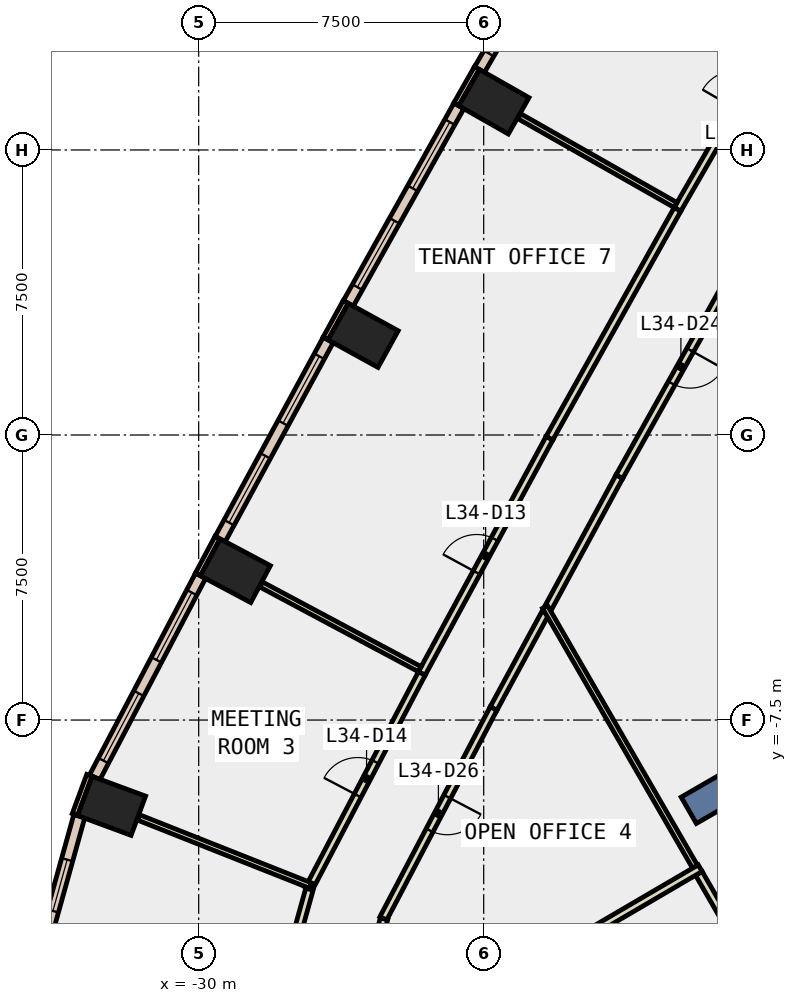
"""IFC4 building model, lengths in metres.
Left out: names, types, materials, properties, quantities, classifications, styles, units other than length and angle.
Written with IfcOpenShell. Run it as: python <this file> out.ifc"""

import sys

from ifc_helpers import new_model, si_unit, direction, frame, frame_2d, origin, origin_2d, place, context, subcontext, project, spatial, rectangle, extrude, element, fill, save


model = new_model("IFC4")
c1 = context("Model", 3, precision=1e-05, world=origin(), true_north=direction((0.0, 1.0)))
c2 = subcontext(c1, "Body", "Model", "MODEL_VIEW")
j1 = project(units=[si_unit("LENGTHUNIT", "METRE"), si_unit("PLANEANGLEUNIT", "RADIAN")], contexts=[c1])
p1 = place(None, origin())
s1 = spatial("IfcSite", under=j1, at=p1, CompositionType="ELEMENT")
p2 = place(p1, origin())
s2 = spatial("IfcBuilding", under=s1, at=p2, CompositionType="ELEMENT")
p3 = place(p2, frame((0.0, 0.0, 155.0)))
s3 = spatial("IfcBuildingStorey", under=s2, at=p3, CompositionType="ELEMENT", Elevation=155.0)
for number, where, z_axis, x_axis in (
    (1, (-22.232, 8.769, -0.4), (0.0, 0.0, 1.0), (0.494, 0.869, 0.0)),
    (2, (-25.673, 2.622, -0.4), (0.0, 0.0, 1.0), (0.482, 0.876, 0.0)),
    (3, (-29.034, -3.571, -0.4), (0.0, 0.0, 1.0), (0.47, 0.883, 0.0)),
    (4, (-32.292, -9.758, -0.4), (0.0, 0.0, 1.0), (0.347, 0.938, 0.0)),
):
    element("IfcColumn", number, at=place(p3, frame(where, z_axis=z_axis, x_axis=x_axis)), inside=s3, PredefinedType="COLUMN", context=c2, shape_type="SweptSolid", body=[
        extrude(rectangle(XDim=1.1, YDim=1.5, at=origin_2d()), origin(), (0.0, 0.0, 1.0), 4.2),
    ])
p4 = place(p3, frame((-9.31, -5.375, -0.4), z_axis=(0.0, 0.0, 1.0), x_axis=(-0.866017533419, -0.500013631625, 0.0)))
e5 = element("IfcWall", 5, at=p4, inside=s3, PredefinedType="SHEAR", context=c2, shape_type="SweptSolid", body=[
    extrude(rectangle(XDim=9.0, YDim=0.8, at=frame_2d((4.5, 0.0))), origin(), (0.0, 0.0, 1.0), 4.2),
])
for number, where, z_axis, x_axis in (
    (6, (-22.678, 9.655, 0.0), (0.0, 0.0, 1.0), (-0.495, -0.869, 0.0)),
    (7, (-26.131, 3.502, 0.0), (0.0, 0.0, 1.0), (-0.482, -0.876, 0.0)),
):
    element("IfcWall", number, at=place(p3, frame(where, z_axis=z_axis, x_axis=x_axis)), inside=s3, PredefinedType="STANDARD", context=c2, shape_type="SweptSolid", body=[
        extrude(rectangle(XDim=1.1, YDim=0.15, at=frame_2d((0.55, 0.0))), origin(), (0.0, 0.0, 1.0), 3.8),
    ])
for number, where, z_axis, x_axis in (
    (8, (-29.503, -2.698, 0.0), (0.0, 0.0, 1.0), (-0.47, -0.883, 0.0)),
    (9, (-32.875, -8.956, 0.0), (0.0, 0.0, 1.0), (-0.346, -0.938, 0.0)),
):
    element("IfcWall", number, at=place(p3, frame(where, z_axis=z_axis, x_axis=x_axis)), inside=s3, PredefinedType="STANDARD", context=c2, shape_type="SweptSolid", body=[
        extrude(rectangle(XDim=1.1, YDim=0.15, at=frame_2d((0.55, 0.0))), origin(), (0.0, 0.0, 1.0), 3.8),
    ])
p5 = place(p3, frame((-19.631, 14.774, 0.0), z_axis=(0.0, 0.0, 1.0), x_axis=(-0.500061823953, -0.865989706766, 0.0)))
e10 = element("IfcWall", 10, at=p5, inside=s3, PredefinedType="STANDARD", context=c2, shape_type="SweptSolid", body=[
    extrude(rectangle(XDim=5.957, YDim=0.3, at=frame_2d((2.979, 0.0))), origin(), (0.0, 0.0, 1.0), 3.8),
])
p6 = place(p5, frame((0.489, 0.0, 0.9)))
e11 = element("IfcOpeningElement", 11, at=p6, cuts=e10, PredefinedType="OPENING", context=c2, shape_type="SweptSolid", body=[
    extrude(rectangle(XDim=2.0, YDim=2.6, at=frame_2d((1.0, 1.3))), frame((0.0, 0.16, 0.0), z_axis=(0.0, -1.0, 0.0), x_axis=(1.0, 0.0, 0.0)), (0.0, 0.0, 1.0), 0.32),
])
p7 = place(p5, frame((3.468, 0.0, 0.9)))
e12 = element("IfcOpeningElement", 12, at=p7, cuts=e10, PredefinedType="OPENING", context=c2, shape_type="SweptSolid", body=[
    extrude(rectangle(XDim=2.0, YDim=2.6, at=frame_2d((1.0, 1.3))), frame((0.0, 0.16, 0.0), z_axis=(0.0, -1.0, 0.0), x_axis=(1.0, 0.0, 0.0)), (0.0, 0.0, 1.0), 0.32),
])
p8 = place(p3, frame((-23.153, 8.661, 0.0), z_axis=(0.0, 0.0, 1.0), x_axis=(-0.488354983501, -0.872645065356, 0.0)))
e13 = element("IfcWall", 13, at=p8, inside=s3, PredefinedType="STANDARD", context=c2, shape_type="SweptSolid", body=[
    extrude(rectangle(XDim=5.957, YDim=0.3, at=frame_2d((2.978, 0.0))), origin(), (0.0, 0.0, 1.0), 3.8),
])
p9 = place(p8, frame((0.489, 0.0, 0.9)))
e14 = element("IfcOpeningElement", 14, at=p9, cuts=e13, PredefinedType="OPENING", context=c2, shape_type="SweptSolid", body=[
    extrude(rectangle(XDim=2.0, YDim=2.6, at=frame_2d((1.0, 1.3))), frame((0.0, 0.16, 0.0), z_axis=(0.0, -1.0, 0.0), x_axis=(1.0, 0.0, 0.0)), (0.0, 0.0, 1.0), 0.32),
])
p10 = place(p8, frame((3.467, 0.0, 0.9)))
e15 = element("IfcOpeningElement", 15, at=p10, cuts=e13, PredefinedType="OPENING", context=c2, shape_type="SweptSolid", body=[
    extrude(rectangle(XDim=2.0, YDim=2.6, at=frame_2d((1.0, 1.3))), frame((0.0, 0.16, 0.0), z_axis=(0.0, -1.0, 0.0), x_axis=(1.0, 0.0, 0.0)), (0.0, 0.0, 1.0), 0.32),
])
p11 = place(p3, frame((-26.592, 2.501, 0.0), z_axis=(0.0, 0.0, 1.0), x_axis=(-0.476970695077, -0.878919197673, 0.0)))
e16 = element("IfcWall", 16, at=p11, inside=s3, PredefinedType="STANDARD", context=c2, shape_type="SweptSolid", body=[
    extrude(rectangle(XDim=5.958, YDim=0.3, at=frame_2d((2.979, 0.0))), origin(), (0.0, 0.0, 1.0), 3.8),
])
p12 = place(p11, frame((0.49, 0.0, 0.9)))
e17 = element("IfcOpeningElement", 17, at=p12, cuts=e16, PredefinedType="OPENING", context=c2, shape_type="SweptSolid", body=[
    extrude(rectangle(XDim=2.0, YDim=2.6, at=frame_2d((1.0, 1.3))), frame((0.0, 0.16, 0.0), z_axis=(0.0, -1.0, 0.0), x_axis=(1.0, 0.0, 0.0)), (0.0, 0.0, 1.0), 0.32),
])
p13 = place(p11, frame((3.469, 0.0, 0.9)))
e18 = element("IfcOpeningElement", 18, at=p13, cuts=e16, PredefinedType="OPENING", context=c2, shape_type="SweptSolid", body=[
    extrude(rectangle(XDim=2.0, YDim=2.6, at=frame_2d((1.0, 1.3))), frame((0.0, 0.16, 0.0), z_axis=(0.0, -1.0, 0.0), x_axis=(1.0, 0.0, 0.0)), (0.0, 0.0, 1.0), 0.32),
])
p14 = place(p3, frame((-29.951, -3.705, 0.0), z_axis=(0.0, 0.0, 1.0), x_axis=(-0.465104650407, -0.885255705528, 0.0)))
e19 = element("IfcWall", 19, at=p14, inside=s3, PredefinedType="STANDARD", context=c2, shape_type="SweptSolid", body=[
    extrude(rectangle(XDim=5.99, YDim=0.3, at=frame_2d((2.995, 0.0))), origin(), (0.0, 0.0, 1.0), 3.8),
])
p15 = place(p14, frame((0.498, 0.0, 0.9)))
e20 = element("IfcOpeningElement", 20, at=p15, cuts=e19, PredefinedType="OPENING", context=c2, shape_type="SweptSolid", body=[
    extrude(rectangle(XDim=2.0, YDim=2.6, at=frame_2d((1.0, 1.3))), frame((0.0, 0.16, 0.0), z_axis=(0.0, -1.0, 0.0), x_axis=(1.0, 0.0, 0.0)), (0.0, 0.0, 1.0), 0.32),
])
p16 = place(p14, frame((3.493, 0.0, 0.9)))
e21 = element("IfcOpeningElement", 21, at=p16, cuts=e19, PredefinedType="OPENING", context=c2, shape_type="SweptSolid", body=[
    extrude(rectangle(XDim=2.0, YDim=2.6, at=frame_2d((1.0, 1.3))), frame((0.0, 0.16, 0.0), z_axis=(0.0, -1.0, 0.0), x_axis=(1.0, 0.0, 0.0)), (0.0, 0.0, 1.0), 0.32),
])
p17 = place(p3, frame((-33.142, -10.029, 0.0), z_axis=(0.0, 0.0, 1.0), x_axis=(-0.26799398221, -0.963420585985, 0.0)))
e22 = element("IfcWall", 22, at=p17, inside=s3, PredefinedType="STANDARD", context=c2, shape_type="SweptSolid", body=[
    extrude(rectangle(XDim=3.776, YDim=0.3, at=frame_2d((1.888, 0.0))), origin(), (0.0, 0.0, 1.0), 3.8),
])
p18 = place(p17, frame((1.188, 0.0, 0.9)))
e23 = element("IfcOpeningElement", 23, at=p18, cuts=e22, PredefinedType="OPENING", context=c2, shape_type="SweptSolid", body=[
    extrude(rectangle(XDim=1.4, YDim=2.6, at=frame_2d((0.7, 1.3))), frame((0.0, 0.16, 0.0), z_axis=(0.0, -1.0, 0.0), x_axis=(1.0, 0.0, 0.0)), (0.0, 0.0, 1.0), 0.32),
])
p19 = place(p3, frame((-18.93, -1.095, 0.0), z_axis=(0.0, 0.0, 1.0), x_axis=(-0.476854303058, -0.878982351162, 0.0)))
e24 = element("IfcWall", 24, at=p19, inside=s3, PredefinedType="PARTITIONING", context=c2, shape_type="SweptSolid", body=[
    extrude(rectangle(XDim=3.924, YDim=0.2, at=frame_2d((1.962, 0.0))), origin(), (0.0, 0.0, 1.0), 3.8),
])
p20 = place(p3, frame((-15.692, 4.689, 0.0), z_axis=(0.0, 0.0, 1.0), x_axis=(-0.48849233301, -0.872568186786, 0.0)))
e25 = element("IfcWall", 25, at=p20, inside=s3, PredefinedType="PARTITIONING", context=c2, shape_type="SweptSolid", body=[
    extrude(rectangle(XDim=6.629, YDim=0.2, at=frame_2d((3.314, 0.0))), origin(), (0.0, 0.0, 1.0), 3.8),
])
p21 = place(p20, frame((2.814, 0.0, 0.0)))
e26 = element("IfcOpeningElement", 26, at=p21, cuts=e25, PredefinedType="OPENING", context=c2, shape_type="SweptSolid", body=[
    extrude(rectangle(XDim=1.0, YDim=2.1, at=frame_2d((0.5, 1.05))), frame((0.0, 0.11, 0.0), z_axis=(0.0, -1.0, 0.0), x_axis=(1.0, 0.0, 0.0)), (0.0, 0.0, 1.0), 0.22),
])
p22 = place(p3, frame((-20.873, -4.676, 0.0), z_axis=(0.0, 0.0, 1.0), x_axis=(-0.476781985736, -0.879021579984, 0.0)))
e27 = element("IfcWall", 27, at=p22, inside=s3, PredefinedType="PARTITIONING", context=c2, shape_type="SweptSolid", body=[
    extrude(rectangle(XDim=2.869, YDim=0.2, at=frame_2d((1.435, 0.0))), origin(), (0.0, 0.0, 1.0), 3.8),
])
p23 = place(p3, frame((-22.241, -7.198, 0.0), z_axis=(0.0, 0.0, 1.0), x_axis=(-0.465089990515, -0.885263407536, 0.0)))
e28 = element("IfcWall", 28, at=p23, inside=s3, PredefinedType="PARTITIONING", context=c2, shape_type="SweptSolid", body=[
    extrude(rectangle(XDim=6.24, YDim=0.2, at=frame_2d((3.12, 0.0))), origin(), (0.0, 0.0, 1.0), 3.8),
])
p24 = place(p23, frame((2.62, 0.0, 0.0)))
e29 = element("IfcOpeningElement", 29, at=p24, cuts=e28, PredefinedType="OPENING", context=c2, shape_type="SweptSolid", body=[
    extrude(rectangle(XDim=1.0, YDim=2.1, at=frame_2d((0.5, 1.05))), frame((0.0, 0.11, 0.0), z_axis=(0.0, -1.0, 0.0), x_axis=(1.0, 0.0, 0.0)), (0.0, 0.0, 1.0), 0.22),
])
p25 = place(p3, frame((-25.123, -12.73, 0.0), z_axis=(0.0, 0.0, 1.0), x_axis=(-0.268139825244, -0.963380005044, 0.0)))
e30 = element("IfcWall", 30, at=p25, inside=s3, PredefinedType="PARTITIONING", context=c2, shape_type="SweptSolid", body=[
    extrude(rectangle(XDim=1.726, YDim=0.2, at=frame_2d((0.863, 0.0))), origin(), (0.0, 0.0, 1.0), 3.8),
])
p26 = place(p3, frame((-17.402, 5.936, 0.0), z_axis=(0.0, 0.0, 1.0), x_axis=(0.500135788517, 0.865946992052, 0.0)))
e31 = element("IfcWall", 31, at=p26, inside=s3, PredefinedType="PARTITIONING", context=c2, shape_type="SweptSolid", body=[
    extrude(rectangle(XDim=6.97, YDim=0.2, at=frame_2d((3.485, 0.0))), origin(), (0.0, 0.0, 1.0), 3.8),
])
p27 = place(p26, frame((3.06, 0.0, 0.0)))
e32 = element("IfcOpeningElement", 32, at=p27, cuts=e31, PredefinedType="OPENING", context=c2, shape_type="SweptSolid", body=[
    extrude(rectangle(XDim=1.0, YDim=2.1, at=frame_2d((0.5, 1.05))), frame((0.0, 0.11, 0.0), z_axis=(0.0, -1.0, 0.0), x_axis=(1.0, 0.0, 0.0)), (0.0, 0.0, 1.0), 0.22),
])
p28 = place(p3, frame((-24.13, -6.275, 0.0), z_axis=(0.0, 0.0, 1.0), x_axis=(0.476981750532, 0.878913198023, 0.0)))
e33 = element("IfcWall", 33, at=p28, inside=s3, PredefinedType="PARTITIONING", context=c2, shape_type="SweptSolid", body=[
    extrude(rectangle(XDim=7.046, YDim=0.2, at=frame_2d((3.523, 0.0))), origin(), (0.0, 0.0, 1.0), 3.8),
])
p29 = place(p28, frame((3.023, 0.0, 0.0)))
e34 = element("IfcOpeningElement", 34, at=p29, cuts=e33, PredefinedType="OPENING", context=c2, shape_type="SweptSolid", body=[
    extrude(rectangle(XDim=1.0, YDim=2.1, at=frame_2d((0.5, 1.05))), frame((0.0, 0.11, 0.0), z_axis=(0.0, -1.0, 0.0), x_axis=(1.0, 0.0, 0.0)), (0.0, 0.0, 1.0), 0.22),
])
p30 = place(p3, frame((-20.769, -0.082, 0.0), z_axis=(0.0, 0.0, 1.0), x_axis=(0.488387759141, 0.872626722443, 0.0)))
e35 = element("IfcWall", 35, at=p30, inside=s3, PredefinedType="PARTITIONING", context=c2, shape_type="SweptSolid", body=[
    extrude(rectangle(XDim=6.896, YDim=0.2, at=frame_2d((3.448, 0.0))), origin(), (0.0, 0.0, 1.0), 3.8),
])
p31 = place(p3, frame((-27.106, -11.944, 0.0), z_axis=(0.0, 0.0, 1.0), x_axis=(0.464985599417, 0.885318243534, 0.0)))
e36 = element("IfcWall", 36, at=p31, inside=s3, PredefinedType="PARTITIONING", context=c2, shape_type="SweptSolid", body=[
    extrude(rectangle(XDim=6.402, YDim=0.2, at=frame_2d((3.201, 0.0))), origin(), (0.0, 0.0, 1.0), 3.8),
])
p32 = place(p31, frame((2.776, 0.0, 0.0)))
e37 = element("IfcOpeningElement", 37, at=p32, cuts=e36, PredefinedType="OPENING", context=c2, shape_type="SweptSolid", body=[
    extrude(rectangle(XDim=1.0, YDim=2.1, at=frame_2d((0.5, 1.05))), frame((0.0, 0.11, 0.0), z_axis=(0.0, -1.0, 0.0), x_axis=(1.0, 0.0, 0.0)), (0.0, 0.0, 1.0), 0.22),
])
p33 = place(p3, frame((-27.76, -14.376, 0.0), z_axis=(0.0, 0.0, 1.0), x_axis=(0.267909096687, 0.963444194498, 0.0)))
e38 = element("IfcWall", 38, at=p33, inside=s3, PredefinedType="PARTITIONING", context=c2, shape_type="SweptSolid", body=[
    extrude(rectangle(XDim=2.516, YDim=0.2, at=frame_2d((1.258, 0.0))), origin(), (0.0, 0.0, 1.0), 3.8),
])
p34 = place(p3, frame((-16.939, -11.36, 0.0), z_axis=(0.0, 0.0, 1.0), x_axis=(-0.500053473428, 0.865994528685, 0.0)))
e39 = element("IfcWall", 39, at=p34, inside=s3, PredefinedType="PARTITIONING", context=c2, shape_type="SweptSolid", body=[
    extrude(rectangle(XDim=7.895, YDim=0.15, at=frame_2d((3.948, 0.0))), origin(), (0.0, 0.0, 1.0), 3.8),
])
p35 = place(p3, frame((-15.18, -14.408, 0.0), z_axis=(0.0, 0.0, 1.0), x_axis=(-0.499968694491, 0.866043477274, 0.0)))
e40 = element("IfcWall", 40, at=p35, inside=s3, PredefinedType="PARTITIONING", context=c2, shape_type="SweptSolid", body=[
    extrude(rectangle(XDim=3.319, YDim=0.2, at=frame_2d((1.659, 0.0))), origin(), (0.0, 0.0, 1.0), 3.8),
])
p36 = place(p3, frame((-16.803, -11.397, 0.0), z_axis=(0.0, 0.0, 1.0), x_axis=(-0.863203941699, -0.504855380318, 0.0)))
e41 = element("IfcWall", 41, at=p36, inside=s3, PredefinedType="PARTITIONING", context=c2, shape_type="SweptSolid", body=[
    extrude(rectangle(XDim=8.232, YDim=0.2, at=frame_2d((4.116, 0.0))), origin(), (0.0, 0.0, 1.0), 3.8),
])
p37 = place(p3, frame((-17.451, 6.051, 0.0), z_axis=(0.0, 0.0, 1.0), x_axis=(-0.869409691741, 0.494091882049, 0.0)))
e42 = element("IfcWall", 42, at=p37, inside=s3, PredefinedType="PARTITIONING", context=c2, shape_type="SweptSolid", body=[
    extrude(rectangle(XDim=4.73, YDim=0.15, at=frame_2d((2.365, 0.0))), origin(), (0.0, 0.0, 1.0), 3.8),
])
p38 = place(p3, frame((-24.182, -6.162, 0.0), z_axis=(0.0, 0.0, 1.0), x_axis=(-0.88214427755, 0.470979270866, 0.0)))
e43 = element("IfcWall", 43, at=p38, inside=s3, PredefinedType="PARTITIONING", context=c2, shape_type="SweptSolid", body=[
    extrude(rectangle(XDim=4.731, YDim=0.15, at=frame_2d((2.365, 0.0))), origin(), (0.0, 0.0, 1.0), 3.8),
])
p39 = place(p3, frame((-27.059, -11.855, 0.0), z_axis=(0.0, 0.0, 1.0), x_axis=(-0.92964843089, 0.368447818481, 0.0)))
e44 = element("IfcWall", 44, at=p39, inside=s3, PredefinedType="PARTITIONING", context=c2, shape_type="SweptSolid", body=[
    extrude(rectangle(XDim=4.866, YDim=0.15, at=frame_2d((2.433, 0.0))), origin(), (0.0, 0.0, 1.0), 3.8),
])
p40 = place(p7, origin())
e45 = element("IfcWindow", 45, at=p40, inside=s3, PartitioningType="SINGLE_PANEL", PredefinedType="WINDOW", context=c2, shape_type="SweptSolid", body=[
    extrude(rectangle(XDim=2.0, YDim=2.6, at=frame_2d((1.0, 1.3))), frame((0.0, 0.03, 0.0), z_axis=(0.0, -1.0, 0.0), x_axis=(1.0, 0.0, 0.0)), (0.0, 0.0, 1.0), 0.06),
])
fill(e12, e45)
p41 = place(p9, origin())
e46 = element("IfcWindow", 46, at=p41, inside=s3, PartitioningType="SINGLE_PANEL", PredefinedType="WINDOW", context=c2, shape_type="SweptSolid", body=[
    extrude(rectangle(XDim=2.0, YDim=2.6, at=frame_2d((1.0, 1.3))), frame((0.0, 0.03, 0.0), z_axis=(0.0, -1.0, 0.0), x_axis=(1.0, 0.0, 0.0)), (0.0, 0.0, 1.0), 0.06),
])
fill(e14, e46)
p42 = place(p10, origin())
e47 = element("IfcWindow", 47, at=p42, inside=s3, PartitioningType="SINGLE_PANEL", PredefinedType="WINDOW", context=c2, shape_type="SweptSolid", body=[
    extrude(rectangle(XDim=2.0, YDim=2.6, at=frame_2d((1.0, 1.3))), frame((0.0, 0.03, 0.0), z_axis=(0.0, -1.0, 0.0), x_axis=(1.0, 0.0, 0.0)), (0.0, 0.0, 1.0), 0.06),
])
fill(e15, e47)
p43 = place(p12, origin())
e48 = element("IfcWindow", 48, at=p43, inside=s3, PartitioningType="SINGLE_PANEL", PredefinedType="WINDOW", context=c2, shape_type="SweptSolid", body=[
    extrude(rectangle(XDim=2.0, YDim=2.6, at=frame_2d((1.0, 1.3))), frame((0.0, 0.03, 0.0), z_axis=(0.0, -1.0, 0.0), x_axis=(1.0, 0.0, 0.0)), (0.0, 0.0, 1.0), 0.06),
])
fill(e17, e48)
p44 = place(p13, origin())
e49 = element("IfcWindow", 49, at=p44, inside=s3, PartitioningType="SINGLE_PANEL", PredefinedType="WINDOW", context=c2, shape_type="SweptSolid", body=[
    extrude(rectangle(XDim=2.0, YDim=2.6, at=frame_2d((1.0, 1.3))), frame((0.0, 0.03, 0.0), z_axis=(0.0, -1.0, 0.0), x_axis=(1.0, 0.0, 0.0)), (0.0, 0.0, 1.0), 0.06),
])
fill(e18, e49)
p45 = place(p15, origin())
e50 = element("IfcWindow", 50, at=p45, inside=s3, PartitioningType="SINGLE_PANEL", PredefinedType="WINDOW", context=c2, shape_type="SweptSolid", body=[
    extrude(rectangle(XDim=2.0, YDim=2.6, at=frame_2d((1.0, 1.3))), frame((0.0, 0.03, 0.0), z_axis=(0.0, -1.0, 0.0), x_axis=(1.0, 0.0, 0.0)), (0.0, 0.0, 1.0), 0.06),
])
fill(e20, e50)
p46 = place(p16, origin())
e51 = element("IfcWindow", 51, at=p46, inside=s3, PartitioningType="SINGLE_PANEL", PredefinedType="WINDOW", context=c2, shape_type="SweptSolid", body=[
    extrude(rectangle(XDim=2.0, YDim=2.6, at=frame_2d((1.0, 1.3))), frame((0.0, 0.03, 0.0), z_axis=(0.0, -1.0, 0.0), x_axis=(1.0, 0.0, 0.0)), (0.0, 0.0, 1.0), 0.06),
])
fill(e21, e51)
p47 = place(p18, origin())
e52 = element("IfcWindow", 52, at=p47, inside=s3, PartitioningType="SINGLE_PANEL", PredefinedType="WINDOW", context=c2, shape_type="SweptSolid", body=[
    extrude(rectangle(XDim=1.4, YDim=2.6, at=frame_2d((0.7, 1.3))), frame((0.0, 0.03, 0.0), z_axis=(0.0, -1.0, 0.0), x_axis=(1.0, 0.0, 0.0)), (0.0, 0.0, 1.0), 0.06),
])
fill(e23, e52)
p48 = place(p29, origin())
e53 = element("IfcDoor", 53, at=p48, inside=s3, OperationType="SINGLE_SWING_RIGHT", PredefinedType="DOOR", context=c2, shape_type="SweptSolid", body=[
    extrude(rectangle(XDim=1.0, YDim=2.1, at=frame_2d((0.5, 1.05))), frame((0.0, 0.025, 0.0), z_axis=(0.0, -1.0, 0.0), x_axis=(1.0, 0.0, 0.0)), (0.0, 0.0, 1.0), 0.05),
])
fill(e34, e53)
p49 = place(p32, origin())
e54 = element("IfcDoor", 54, at=p49, inside=s3, OperationType="SINGLE_SWING_LEFT", PredefinedType="DOOR", context=c2, shape_type="SweptSolid", body=[
    extrude(rectangle(XDim=1.0, YDim=2.1, at=frame_2d((0.5, 1.05))), frame((0.0, 0.025, 0.0), z_axis=(0.0, -1.0, 0.0), x_axis=(1.0, 0.0, 0.0)), (0.0, 0.0, 1.0), 0.05),
])
fill(e37, e54)
p50 = place(p21, origin())
e55 = element("IfcDoor", 55, at=p50, inside=s3, OperationType="SINGLE_SWING_LEFT", PredefinedType="DOOR", context=c2, shape_type="SweptSolid", body=[
    extrude(rectangle(XDim=1.0, YDim=2.1, at=frame_2d((0.5, 1.05))), frame((0.0, 0.025, 0.0), z_axis=(0.0, -1.0, 0.0), x_axis=(1.0, 0.0, 0.0)), (0.0, 0.0, 1.0), 0.05),
])
fill(e26, e55)
p51 = place(p24, origin())
e56 = element("IfcDoor", 56, at=p51, inside=s3, OperationType="SINGLE_SWING_LEFT", PredefinedType="DOOR", context=c2, shape_type="SweptSolid", body=[
    extrude(rectangle(XDim=1.0, YDim=2.1, at=frame_2d((0.5, 1.05))), frame((0.0, 0.025, 0.0), z_axis=(0.0, -1.0, 0.0), x_axis=(1.0, 0.0, 0.0)), (0.0, 0.0, 1.0), 0.05),
])
fill(e29, e56)
save(model, sys.argv[1])
